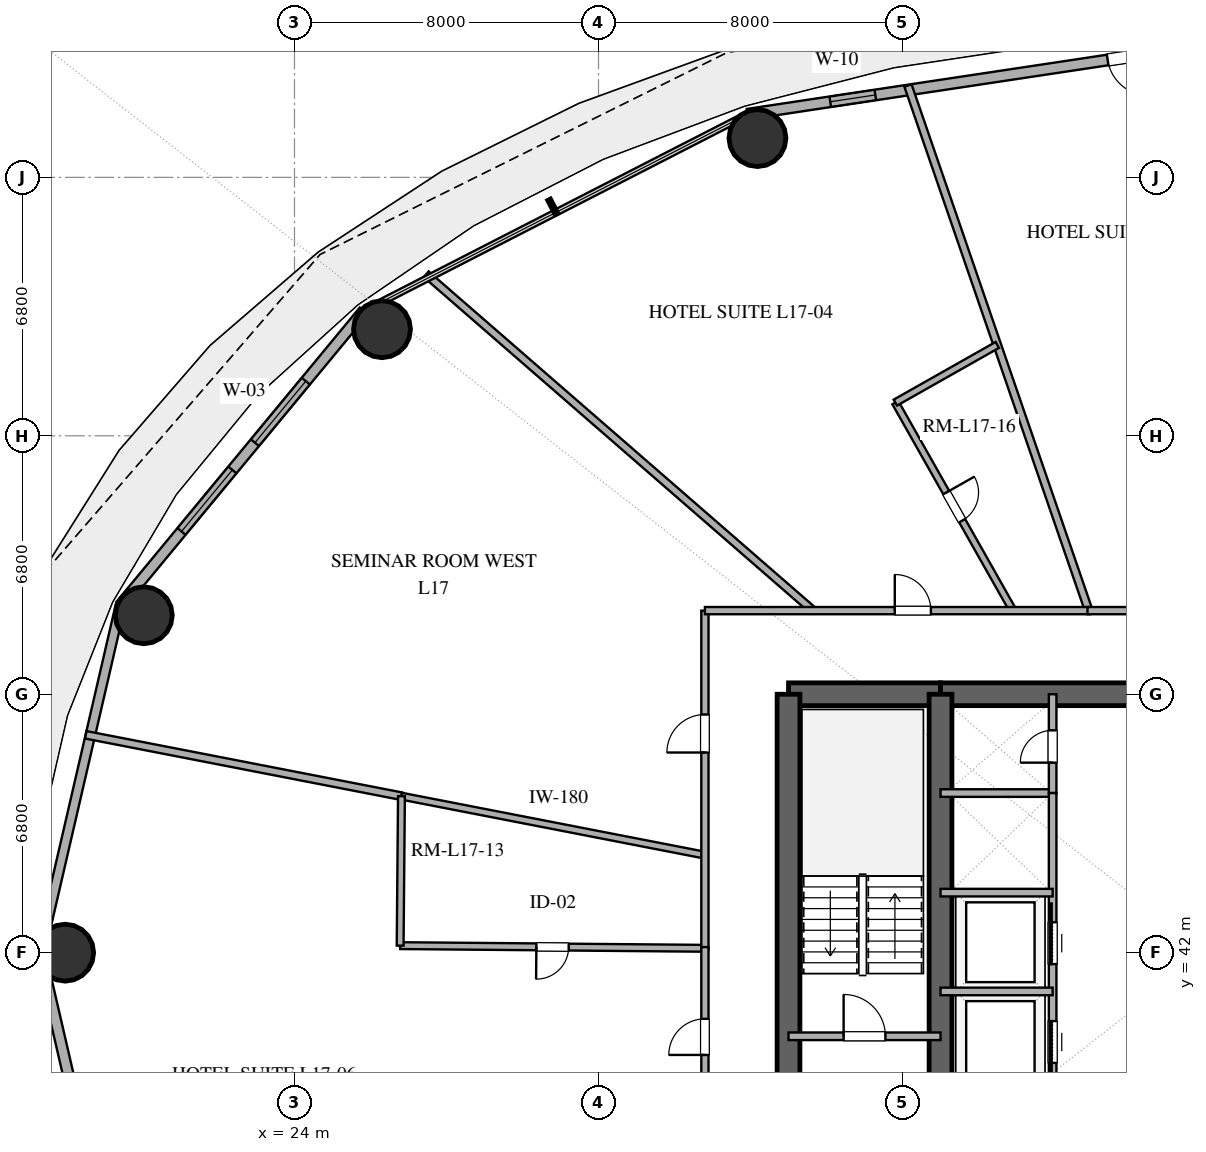
"""IFC4 building model, lengths in metres.
Left out: names, types, materials, properties, quantities, classifications, styles, units other than length and angle.
Written with IfcOpenShell. Run it as: python <this file> out.ifc"""

import sys

from ifc_helpers import new_model, si_unit, direction, frame, frame_2d, origin, origin_2d, place, context, subcontext, project, spatial, rectangle, hollow_circle, extrude, element, fill, save


model = new_model("IFC4")
c1 = context("Model", 3, precision=1e-05, world=origin(), true_north=direction((0.0, 1.0)))
c2 = subcontext(c1, "Body", "Model", "MODEL_VIEW")
j1 = project(units=[si_unit("LENGTHUNIT", "METRE"), si_unit("PLANEANGLEUNIT", "RADIAN")], contexts=[c1])
p1 = place(None, origin())
s1 = spatial("IfcSite", under=j1, at=p1, CompositionType="ELEMENT")
p2 = place(p1, origin())
s2 = spatial("IfcBuilding", under=s1, at=p2, CompositionType="ELEMENT")
p3 = place(p2, frame((0.0, 0.0, 71.4)))
s3 = spatial("IfcBuildingStorey", under=s2, at=p3, CompositionType="ELEMENT", Elevation=71.4)
p4 = place(p3, frame((37.0, 48.8, 0.0), z_axis=(0.0, 0.0, 1.0), x_axis=(1.0, 0.0, 0.0)))
e1 = element("IfcWall", 1, at=p4, inside=s3, PredefinedType="SHEAR", context=c2, shape_type="SweptSolid", body=[
    extrude(rectangle(XDim=4.0, YDim=0.6, at=frame_2d((2.0, 0.0))), origin(), (0.0, 0.0, 1.0), 3.38),
])
p5 = place(p3, frame((41.0, 48.8, 0.0), z_axis=(0.0, 0.0, 1.0), x_axis=(1.0, 0.0, 0.0)))
e2 = element("IfcWall", 2, at=p5, inside=s3, PredefinedType="SHEAR", context=c2, shape_type="SweptSolid", body=[
    extrude(rectangle(XDim=14.0, YDim=0.6, at=frame_2d((7.0, 0.0))), origin(), (0.0, 0.0, 1.0), 3.38),
])
p6 = place(p5, frame((6.1, 0.0, 0.0)))
e3 = element("IfcOpeningElement", 3, at=p6, cuts=e2, PredefinedType="OPENING", context=c2, shape_type="SweptSolid", body=[
    extrude(rectangle(XDim=1.8, YDim=2.25, at=frame_2d((0.9, 1.125))), frame((0.0, 0.31, 0.0), z_axis=(0.0, -1.0, 0.0), x_axis=(1.0, 0.0, 0.0)), (0.0, 0.0, 1.0), 0.62),
])
p7 = place(p3, frame((37.0, 35.2, 0.0), z_axis=(0.0, 0.0, 1.0), x_axis=(0.0, 1.0, 0.0)))
e4 = element("IfcWall", 4, at=p7, inside=s3, PredefinedType="SHEAR", context=c2, shape_type="SweptSolid", body=[
    extrude(rectangle(XDim=13.6, YDim=0.6, at=frame_2d((6.8, 0.0))), origin(), (0.0, 0.0, 1.0), 3.38),
])
p8 = place(p7, frame((1.5, 0.0, 0.0)))
e5 = element("IfcOpeningElement", 5, at=p8, cuts=e4, PredefinedType="OPENING", context=c2, shape_type="SweptSolid", body=[
    extrude(rectangle(XDim=1.2, YDim=2.15, at=frame_2d((0.6, 1.075))), frame((0.0, 0.31, 0.0), z_axis=(0.0, -1.0, 0.0), x_axis=(1.0, 0.0, 0.0)), (0.0, 0.0, 1.0), 0.62),
])
p9 = place(p3, frame((41.0, 35.2, 0.0), z_axis=(0.0, 0.0, 1.0), x_axis=(0.0, 1.0, 0.0)))
e6 = element("IfcWall", 6, at=p9, inside=s3, PredefinedType="SHEAR", context=c2, shape_type="SweptSolid", body=[
    extrude(rectangle(XDim=13.6, YDim=0.6, at=frame_2d((6.8, 0.0))), origin(), (0.0, 0.0, 1.0), 3.38),
])
p10 = place(p9, frame((1.15, 0.0, 0.0)))
e7 = element("IfcOpeningElement", 7, at=p10, cuts=e6, PredefinedType="OPENING", context=c2, shape_type="SweptSolid", body=[
    extrude(rectangle(XDim=1.1, YDim=2.2, at=frame_2d((0.55, 1.1))), frame((0.0, 0.31, 0.0), z_axis=(0.0, -1.0, 0.0), x_axis=(1.0, 0.0, 0.0)), (0.0, 0.0, 1.0), 0.62),
])
for number, where, z_axis, x_axis in (
    (8, (36.182, 63.434, 0.0), (0.0, 0.0, 1.0), (1.0, 0.0, 0.0)),
    (9, (26.303, 58.405, 0.0), (0.0, 0.0, 1.0), (1.0, 0.0, 0.0)),
    (10, (20.034, 50.878, 0.0), (0.0, 0.0, 1.0), (1.0, 0.0, 0.0)),
    (11, (17.965, 42.0, 0.0), (0.0, 0.0, 1.0), (1.0, 0.0, 0.0)),
):
    element("IfcColumn", number, at=place(p3, frame(where, z_axis=z_axis, x_axis=x_axis)), inside=s3, PredefinedType="COLUMN", context=c2, shape_type="SweptSolid", body=[
        extrude(hollow_circle(Radius=0.75, WallThickness=0.04, at=origin_2d()), origin(), (0.0, 0.0, 1.0), 3.38),
    ])
p11 = place(p3, frame((48.0, 65.88, 0.0), z_axis=(0.0, 0.0, 1.0), x_axis=(-0.988864835849, -0.148816452121, 0.0)))
e12 = element("IfcWall", 12, at=p11, inside=s3, PredefinedType="SOLIDWALL", context=c2, shape_type="SweptSolid", body=[
    extrude(rectangle(XDim=12.214, YDim=0.28, at=frame_2d((6.107, 0.0))), origin(), (0.0, 0.0, 1.0), 3.38),
])
p12 = place(p11, frame((1.531, 0.0, 0.0)))
e13 = element("IfcOpeningElement", 13, at=p12, cuts=e12, PredefinedType="OPENING", context=c2, shape_type="SweptSolid", body=[
    extrude(rectangle(XDim=1.1, YDim=2.25, at=frame_2d((0.55, 1.125))), frame((0.0, 0.15, 0.0), z_axis=(0.0, -1.0, 0.0), x_axis=(1.0, 0.0, 0.0)), (0.0, 0.0, 1.0), 0.3),
])
p13 = place(p11, frame((8.814, 0.0, 0.85)))
e14 = element("IfcOpeningElement", 14, at=p13, cuts=e12, PredefinedType="OPENING", context=c2, shape_type="SweptSolid", body=[
    extrude(rectangle(XDim=1.2, YDim=1.6, at=frame_2d((0.6, 0.8))), frame((0.0, 0.15, 0.0), z_axis=(0.0, -1.0, 0.0), x_axis=(1.0, 0.0, 0.0)), (0.0, 0.0, 1.0), 0.3),
])
p14 = place(p3, frame((25.826, 58.886, 0.0), z_axis=(0.0, 0.0, 1.0), x_axis=(-0.637296809613, -0.770618437657, 0.0)))
e15 = element("IfcWall", 15, at=p14, inside=s3, PredefinedType="SOLIDWALL", context=c2, shape_type="SweptSolid", body=[
    extrude(rectangle(XDim=10.053, YDim=0.28, at=frame_2d((5.027, 0.0))), origin(), (0.0, 0.0, 1.0), 3.38),
])
p15 = place(p14, frame((2.398, 0.0, 0.85)))
e16 = element("IfcOpeningElement", 16, at=p15, cuts=e15, PredefinedType="OPENING", context=c2, shape_type="SweptSolid", body=[
    extrude(rectangle(XDim=2.1, YDim=2.2, at=frame_2d((1.05, 1.1))), frame((0.0, 0.15, 0.0), z_axis=(0.0, -1.0, 0.0), x_axis=(1.0, 0.0, 0.0)), (0.0, 0.0, 1.0), 0.3),
])
p16 = place(p14, frame((5.43, 0.0, 0.85)))
e17 = element("IfcOpeningElement", 17, at=p16, cuts=e15, PredefinedType="OPENING", context=c2, shape_type="SweptSolid", body=[
    extrude(rectangle(XDim=2.1, YDim=2.2, at=frame_2d((1.05, 1.1))), frame((0.0, 0.15, 0.0), z_axis=(0.0, -1.0, 0.0), x_axis=(1.0, 0.0, 0.0)), (0.0, 0.0, 1.0), 0.3),
])
p17 = place(p3, frame((19.419, 51.138, 0.0), z_axis=(0.0, 0.0, 1.0), x_axis=(-0.225454452941, -0.974253709076, 0.0)))
e18 = element("IfcWall", 18, at=p17, inside=s3, PredefinedType="SOLIDWALL", context=c2, shape_type="SweptSolid", body=[
    extrude(rectangle(XDim=9.38, YDim=0.25, at=frame_2d((4.69, 0.0))), origin(), (0.0, 0.0, 1.0), 3.38),
])
p18 = place(p3, frame((17.304, 42.0, 0.0), z_axis=(0.0, 0.0, 1.0), x_axis=(0.225454452941, -0.974253709076, 0.0)))
e19 = element("IfcWall", 19, at=p18, inside=s3, PredefinedType="SOLIDWALL", context=c2, shape_type="SweptSolid", body=[
    extrude(rectangle(XDim=9.38, YDim=0.28, at=frame_2d((4.69, 0.0))), origin(), (0.0, 0.0, 1.0), 3.38),
])
p19 = place(p18, frame((6.785, 0.0, 0.0)))
e20 = element("IfcOpeningElement", 20, at=p19, cuts=e19, PredefinedType="OPENING", context=c2, shape_type="SweptSolid", body=[
    extrude(rectangle(XDim=1.05, YDim=2.2, at=frame_2d((0.525, 1.1))), frame((0.0, 0.15, 0.0), z_axis=(0.0, -1.0, 0.0), x_axis=(1.0, 0.0, 0.0)), (0.0, 0.0, 1.0), 0.3),
])
p20 = place(p3, frame((37.0, 39.8, 0.0), z_axis=(0.0, 0.0, 1.0), x_axis=(1.0, 0.0, 0.0)))
e21 = element("IfcWall", 21, at=p20, inside=s3, PredefinedType="SOLIDWALL", context=c2, shape_type="SweptSolid", body=[
    extrude(rectangle(XDim=4.0, YDim=0.2, at=frame_2d((2.0, 0.0))), origin(), (0.0, 0.0, 1.0), 2.74),
])
p21 = place(p20, frame((1.45, 0.0, 0.0)))
e22 = element("IfcOpeningElement", 22, at=p21, cuts=e21, PredefinedType="OPENING", context=c2, shape_type="SweptSolid", body=[
    extrude(rectangle(XDim=1.1, YDim=2.15, at=frame_2d((0.55, 1.075))), frame((0.0, 0.11, 0.0), z_axis=(0.0, -1.0, 0.0), x_axis=(1.0, 0.0, 0.0)), (0.0, 0.0, 1.0), 0.22),
])
p22 = place(p3, frame((41.0, 46.2, 0.0), z_axis=(0.0, 0.0, 1.0), x_axis=(1.0, 0.0, 0.0)))
e23 = element("IfcWall", 23, at=p22, inside=s3, PredefinedType="SOLIDWALL", context=c2, shape_type="SweptSolid", body=[
    extrude(rectangle(XDim=2.95, YDim=0.2, at=frame_2d((1.475, 0.0))), origin(), (0.0, 0.0, 1.0), 2.74),
])
p23 = place(p3, frame((43.95, 46.2, 0.0), z_axis=(0.0, 0.0, 1.0), x_axis=(0.0, 1.0, 0.0)))
e24 = element("IfcWall", 24, at=p23, inside=s3, PredefinedType="SOLIDWALL", context=c2, shape_type="SweptSolid", body=[
    extrude(rectangle(XDim=2.6, YDim=0.2, at=frame_2d((1.3, 0.0))), origin(), (0.0, 0.0, 1.0), 2.74),
])
p24 = place(p23, frame((0.8, 0.0, 0.0)))
e25 = element("IfcOpeningElement", 25, at=p24, cuts=e24, PredefinedType="OPENING", context=c2, shape_type="SweptSolid", body=[
    extrude(rectangle(XDim=0.85, YDim=2.15, at=frame_2d((0.425, 1.075))), frame((0.0, 0.11, 0.0), z_axis=(0.0, -1.0, 0.0), x_axis=(1.0, 0.0, 0.0)), (0.0, 0.0, 1.0), 0.22),
])
p25 = place(p3, frame((43.95, 38.4, 0.0), z_axis=(0.0, 0.0, 1.0), x_axis=(0.0, 1.0, 0.0)))
e26 = element("IfcWall", 26, at=p25, inside=s3, PredefinedType="SOLIDWALL", context=c2, shape_type="SweptSolid", body=[
    extrude(rectangle(XDim=7.8, YDim=0.2, at=frame_2d((3.9, 0.0))), origin(), (0.0, 0.0, 1.0), 2.74),
])
p26 = place(p25, frame((0.7, 0.0, 0.0)))
e27 = element("IfcOpeningElement", 27, at=p26, cuts=e26, PredefinedType="OPENING", context=c2, shape_type="SweptSolid", body=[
    extrude(rectangle(XDim=1.1, YDim=2.2, at=frame_2d((0.55, 1.1))), frame((0.0, 0.11, 0.0), z_axis=(0.0, -1.0, 0.0), x_axis=(1.0, 0.0, 0.0)), (0.0, 0.0, 1.0), 0.22),
])
p27 = place(p25, frame((3.3, 0.0, 0.0)))
e28 = element("IfcOpeningElement", 28, at=p27, cuts=e26, PredefinedType="OPENING", context=c2, shape_type="SweptSolid", body=[
    extrude(rectangle(XDim=1.1, YDim=2.2, at=frame_2d((0.55, 1.1))), frame((0.0, 0.11, 0.0), z_axis=(0.0, -1.0, 0.0), x_axis=(1.0, 0.0, 0.0)), (0.0, 0.0, 1.0), 0.22),
])
for number, where, z_axis, x_axis in (
    (29, (41.0, 40.98, 0.0), (0.0, 0.0, 1.0), (1.0, 0.0, 0.0)),
    (30, (41.0, 43.58, 0.0), (0.0, 0.0, 1.0), (1.0, 0.0, 0.0)),
):
    element("IfcWall", number, at=place(p3, frame(where, z_axis=z_axis, x_axis=x_axis)), inside=s3, PredefinedType="SOLIDWALL", context=c2, shape_type="SweptSolid", body=[
        extrude(rectangle(XDim=2.95, YDim=0.2, at=frame_2d((1.475, 0.0))), origin(), (0.0, 0.0, 1.0), 2.74),
    ])
p28 = place(p3, frame((37.647, 51.0, 0.0), z_axis=(0.0, 0.0, 1.0), x_axis=(-0.754713815472, 0.656054156862, 0.0)))
e31 = element("IfcWall", 31, at=p28, inside=s3, PredefinedType="PARTITIONING", context=c2, shape_type="SweptSolid", body=[
    extrude(rectangle(XDim=13.491, YDim=0.2, at=frame_2d((6.746, 0.0))), origin(), (0.0, 0.0, 1.0), 2.74),
])
p29 = place(p3, frame((18.508, 47.733, 0.0), z_axis=(0.0, 0.0, 1.0), x_axis=(0.981626048747, -0.190814832812, 0.0)))
e32 = element("IfcWall", 32, at=p29, inside=s3, PredefinedType="PARTITIONING", context=c2, shape_type="SweptSolid", body=[
    extrude(rectangle(XDim=8.462, YDim=0.2, at=frame_2d((4.231, 0.0))), origin(), (0.0, 0.0, 1.0), 2.74),
])
p30 = place(p3, frame((26.815, 46.118, 0.0), z_axis=(0.0, 0.0, 1.0), x_axis=(0.981631630513, -0.190786115787, 0.0)))
e33 = element("IfcWall", 33, at=p30, inside=s3, PredefinedType="PLUMBINGWALL", context=c2, shape_type="SweptSolid", body=[
    extrude(rectangle(XDim=8.135, YDim=0.18, at=frame_2d((4.067, 0.0))), origin(), (0.0, 0.0, 1.0), 2.74),
])
p31 = place(p3, frame((34.8, 42.115, 0.0), z_axis=(0.0, 0.0, 1.0), x_axis=(-0.999961832732, 0.008736880358, 0.0)))
e34 = element("IfcWall", 34, at=p31, inside=s3, PredefinedType="PLUMBINGWALL", context=c2, shape_type="SweptSolid", body=[
    extrude(rectangle(XDim=8.02, YDim=0.18, at=frame_2d((4.01, 0.0))), origin(), (0.0, 0.0, 1.0), 2.74),
])
p32 = place(p31, frame((3.585, 0.0, 0.0)))
e35 = element("IfcOpeningElement", 35, at=p32, cuts=e34, PredefinedType="OPENING", context=c2, shape_type="SweptSolid", body=[
    extrude(rectangle(XDim=0.85, YDim=2.1, at=frame_2d((0.425, 1.05))), frame((0.0, 0.1, 0.0), z_axis=(0.0, -1.0, 0.0), x_axis=(1.0, 0.0, 0.0)), (0.0, 0.0, 1.0), 0.2),
])
p33 = place(p3, frame((44.901, 51.0, 0.0), z_axis=(0.0, 0.0, 1.0), x_axis=(-0.325569992405, 0.945517942741, 0.0)))
e36 = element("IfcWall", 36, at=p33, inside=s3, PredefinedType="PARTITIONING", context=c2, shape_type="SweptSolid", body=[
    extrude(rectangle(XDim=14.613, YDim=0.2, at=frame_2d((7.307, 0.0))), origin(), (0.0, 0.0, 1.0), 2.74),
])
p34 = place(p3, frame((34.8, 42.083, 0.0), z_axis=(0.0, 0.0, 1.0), x_axis=(0.0, 1.0, 0.0)))
e37 = element("IfcWall", 37, at=p34, inside=s3, PredefinedType="PARTITIONING", context=c2, shape_type="SweptSolid", body=[
    extrude(rectangle(XDim=8.917, YDim=0.19, at=frame_2d((4.458, 0.0))), origin(), (0.0, 0.0, 1.0), 2.74),
])
p35 = place(p34, frame((5.183, 0.0, 0.0)))
e38 = element("IfcOpeningElement", 38, at=p35, cuts=e37, PredefinedType="OPENING", context=c2, shape_type="SweptSolid", body=[
    extrude(rectangle(XDim=1.0, YDim=2.2, at=frame_2d((0.5, 1.1))), frame((0.0, 0.105, 0.0), z_axis=(0.0, -1.0, 0.0), x_axis=(1.0, 0.0, 0.0)), (0.0, 0.0, 1.0), 0.21),
])
p36 = place(p3, frame((39.811, 56.473, 0.0), z_axis=(0.0, 0.0, 1.0), x_axis=(0.492421798109, -0.870356692826, 0.0)))
e39 = element("IfcWall", 39, at=p36, inside=s3, PredefinedType="PLUMBINGWALL", context=c2, shape_type="SweptSolid", body=[
    extrude(rectangle(XDim=6.289, YDim=0.18, at=frame_2d((3.144, 0.0))), origin(), (0.0, 0.0, 1.0), 2.74),
])
p37 = place(p36, frame((2.719, 0.0, 0.0)))
e40 = element("IfcOpeningElement", 40, at=p37, cuts=e39, PredefinedType="OPENING", context=c2, shape_type="SweptSolid", body=[
    extrude(rectangle(XDim=0.85, YDim=2.1, at=frame_2d((0.425, 1.05))), frame((0.0, 0.1, 0.0), z_axis=(0.0, -1.0, 0.0), x_axis=(1.0, 0.0, 0.0)), (0.0, 0.0, 1.0), 0.2),
])
p38 = place(p3, frame((34.8, 51.0, 0.0), z_axis=(0.0, 0.0, 1.0), x_axis=(1.0, 0.0, 0.0)))
e41 = element("IfcWall", 41, at=p38, inside=s3, PredefinedType="PARTITIONING", context=c2, shape_type="SweptSolid", body=[
    extrude(rectangle(XDim=10.135, YDim=0.19, at=frame_2d((5.067, 0.0))), origin(), (0.0, 0.0, 1.0), 2.74),
])
p39 = place(p38, frame((4.996, 0.0, 0.0)))
e42 = element("IfcOpeningElement", 42, at=p39, cuts=e41, PredefinedType="OPENING", context=c2, shape_type="SweptSolid", body=[
    extrude(rectangle(XDim=0.95, YDim=2.15, at=frame_2d((0.475, 1.075))), frame((0.0, 0.105, 0.0), z_axis=(0.0, -1.0, 0.0), x_axis=(1.0, 0.0, 0.0)), (0.0, 0.0, 1.0), 0.21),
])
p40 = place(p3, frame((34.8, 33.0, 0.0), z_axis=(0.0, 0.0, 1.0), x_axis=(0.0, 1.0, 0.0)))
e43 = element("IfcWall", 43, at=p40, inside=s3, PredefinedType="PARTITIONING", context=c2, shape_type="SweptSolid", body=[
    extrude(rectangle(XDim=9.147, YDim=0.19, at=frame_2d((4.574, 0.0))), origin(), (0.0, 0.0, 1.0), 2.74),
])
p41 = place(p40, frame((6.309, 0.0, 0.0)))
e44 = element("IfcOpeningElement", 44, at=p41, cuts=e43, PredefinedType="OPENING", context=c2, shape_type="SweptSolid", body=[
    extrude(rectangle(XDim=0.95, YDim=2.15, at=frame_2d((0.475, 1.075))), frame((0.0, 0.105, 0.0), z_axis=(0.0, -1.0, 0.0), x_axis=(1.0, 0.0, 0.0)), (0.0, 0.0, 1.0), 0.21),
])
p42 = place(p3, frame((26.781, 42.185, 0.0), z_axis=(0.0, 0.0, 1.0), x_axis=(0.008691005249, 0.999962232501, 0.0)))
e45 = element("IfcWall", 45, at=p42, inside=s3, PredefinedType="PLUMBINGWALL", context=c2, shape_type="SweptSolid", body=[
    extrude(rectangle(XDim=3.933, YDim=0.18, at=frame_2d((1.966, 0.0))), origin(), (0.0, 0.0, 1.0), 2.74),
])
p43 = place(p3, frame((44.867, 51.0, 0.0), z_axis=(0.0, 0.0, 1.0), x_axis=(1.0, 0.0, 0.0)))
e46 = element("IfcWall", 46, at=p43, inside=s3, PredefinedType="PARTITIONING", context=c2, shape_type="SweptSolid", body=[
    extrude(rectangle(XDim=3.243, YDim=0.19, at=frame_2d((1.622, 0.0))), origin(), (0.0, 0.0, 1.0), 2.74),
])
p44 = place(p43, frame((1.146, 0.0, 0.0)))
e47 = element("IfcOpeningElement", 47, at=p44, cuts=e46, PredefinedType="OPENING", context=c2, shape_type="SweptSolid", body=[
    extrude(rectangle(XDim=0.95, YDim=2.15, at=frame_2d((0.475, 1.075))), frame((0.0, 0.105, 0.0), z_axis=(0.0, -1.0, 0.0), x_axis=(1.0, 0.0, 0.0)), (0.0, 0.0, 1.0), 0.21),
])
p45 = place(p3, frame((42.494, 57.991, 0.0), z_axis=(0.0, 0.0, 1.0), x_axis=(-0.87034589465, -0.492440883422, 0.0)))
e48 = element("IfcWall", 48, at=p45, inside=s3, PredefinedType="PLUMBINGWALL", context=c2, shape_type="SweptSolid", body=[
    extrude(rectangle(XDim=3.082, YDim=0.18, at=frame_2d((1.541, 0.0))), origin(), (0.0, 0.0, 1.0), 2.74),
])
p46 = place(p12, origin())
e49 = element("IfcDoor", 49, at=p46, inside=s3, OperationType="SINGLE_SWING_LEFT", PredefinedType="DOOR", context=c2, shape_type="SweptSolid", body=[
    extrude(rectangle(XDim=1.1, YDim=2.25, at=frame_2d((0.55, 1.125))), frame((0.0, 0.025, 0.0), z_axis=(0.0, -1.0, 0.0), x_axis=(1.0, 0.0, 0.0)), (0.0, 0.0, 1.0), 0.05),
])
fill(e13, e49)
p47 = place(p13, origin())
e50 = element("IfcWindow", 50, at=p47, inside=s3, PartitioningType="SINGLE_PANEL", PredefinedType="WINDOW", context=c2, shape_type="SweptSolid", body=[
    extrude(rectangle(XDim=1.2, YDim=1.6, at=frame_2d((0.6, 0.8))), frame((0.0, 0.03, 0.0), z_axis=(0.0, -1.0, 0.0), x_axis=(1.0, 0.0, 0.0)), (0.0, 0.0, 1.0), 0.06),
])
fill(e14, e50)
p48 = place(p15, origin())
e51 = element("IfcWindow", 51, at=p48, inside=s3, PartitioningType="SINGLE_PANEL", PredefinedType="WINDOW", context=c2, shape_type="SweptSolid", body=[
    extrude(rectangle(XDim=2.1, YDim=2.2, at=frame_2d((1.05, 1.1))), frame((0.0, 0.03, 0.0), z_axis=(0.0, -1.0, 0.0), x_axis=(1.0, 0.0, 0.0)), (0.0, 0.0, 1.0), 0.06),
])
fill(e16, e51)
p49 = place(p16, origin())
e52 = element("IfcWindow", 52, at=p49, inside=s3, PartitioningType="SINGLE_PANEL", PredefinedType="WINDOW", context=c2, shape_type="SweptSolid", body=[
    extrude(rectangle(XDim=2.1, YDim=2.2, at=frame_2d((1.05, 1.1))), frame((0.0, 0.03, 0.0), z_axis=(0.0, -1.0, 0.0), x_axis=(1.0, 0.0, 0.0)), (0.0, 0.0, 1.0), 0.06),
])
fill(e17, e52)
p50 = place(p21, origin())
e53 = element("IfcDoor", 53, at=p50, inside=s3, OperationType="SINGLE_SWING_LEFT", PredefinedType="DOOR", context=c2, shape_type="SweptSolid", body=[
    extrude(rectangle(XDim=1.1, YDim=2.15, at=frame_2d((0.55, 1.075))), frame((0.0, 0.025, 0.0), z_axis=(0.0, -1.0, 0.0), x_axis=(1.0, 0.0, 0.0)), (0.0, 0.0, 1.0), 0.05),
])
fill(e22, e53)
p51 = place(p24, origin())
e54 = element("IfcDoor", 54, at=p51, inside=s3, OperationType="SINGLE_SWING_LEFT", PredefinedType="DOOR", context=c2, shape_type="SweptSolid", body=[
    extrude(rectangle(XDim=0.85, YDim=2.15, at=frame_2d((0.425, 1.075))), frame((0.0, 0.025, 0.0), z_axis=(0.0, -1.0, 0.0), x_axis=(1.0, 0.0, 0.0)), (0.0, 0.0, 1.0), 0.05),
])
fill(e25, e54)
p52 = place(p26, origin())
e55 = element("IfcDoor", 55, at=p52, inside=s3, OperationType="SLIDING_TO_LEFT", PredefinedType="DOOR", context=c2, shape_type="SweptSolid", body=[
    extrude(rectangle(XDim=1.1, YDim=2.2, at=frame_2d((0.55, 1.1))), frame((0.0, 0.025, 0.0), z_axis=(0.0, -1.0, 0.0), x_axis=(1.0, 0.0, 0.0)), (0.0, 0.0, 1.0), 0.05),
])
fill(e27, e55)
p53 = place(p27, origin())
e56 = element("IfcDoor", 56, at=p53, inside=s3, OperationType="SLIDING_TO_RIGHT", PredefinedType="DOOR", context=c2, shape_type="SweptSolid", body=[
    extrude(rectangle(XDim=1.1, YDim=2.2, at=frame_2d((0.55, 1.1))), frame((0.0, 0.025, 0.0), z_axis=(0.0, -1.0, 0.0), x_axis=(1.0, 0.0, 0.0)), (0.0, 0.0, 1.0), 0.05),
])
fill(e28, e56)
p54 = place(p32, origin())
e57 = element("IfcDoor", 57, at=p54, inside=s3, OperationType="SINGLE_SWING_RIGHT", PredefinedType="DOOR", context=c2, shape_type="SweptSolid", body=[
    extrude(rectangle(XDim=0.85, YDim=2.1, at=frame_2d((0.425, 1.05))), frame((0.0, 0.025, 0.0), z_axis=(0.0, -1.0, 0.0), x_axis=(1.0, 0.0, 0.0)), (0.0, 0.0, 1.0), 0.05),
])
fill(e35, e57)
p55 = place(p35, origin())
e58 = element("IfcDoor", 58, at=p55, inside=s3, OperationType="SINGLE_SWING_LEFT", PredefinedType="DOOR", context=c2, shape_type="SweptSolid", body=[
    extrude(rectangle(XDim=1.0, YDim=2.2, at=frame_2d((0.5, 1.1))), frame((0.0, 0.025, 0.0), z_axis=(0.0, -1.0, 0.0), x_axis=(1.0, 0.0, 0.0)), (0.0, 0.0, 1.0), 0.05),
])
fill(e38, e58)
p56 = place(p37, origin())
e59 = element("IfcDoor", 59, at=p56, inside=s3, OperationType="SINGLE_SWING_LEFT", PredefinedType="DOOR", context=c2, shape_type="SweptSolid", body=[
    extrude(rectangle(XDim=0.85, YDim=2.1, at=frame_2d((0.425, 1.05))), frame((0.0, 0.025, 0.0), z_axis=(0.0, -1.0, 0.0), x_axis=(1.0, 0.0, 0.0)), (0.0, 0.0, 1.0), 0.05),
])
fill(e40, e59)
p57 = place(p39, origin())
e60 = element("IfcDoor", 60, at=p57, inside=s3, OperationType="SINGLE_SWING_LEFT", PredefinedType="DOOR", context=c2, shape_type="SweptSolid", body=[
    extrude(rectangle(XDim=0.95, YDim=2.15, at=frame_2d((0.475, 1.075))), frame((0.0, 0.025, 0.0), z_axis=(0.0, -1.0, 0.0), x_axis=(1.0, 0.0, 0.0)), (0.0, 0.0, 1.0), 0.05),
])
fill(e42, e60)
p58 = place(p41, origin())
e61 = element("IfcDoor", 61, at=p58, inside=s3, OperationType="SINGLE_SWING_LEFT", PredefinedType="DOOR", context=c2, shape_type="SweptSolid", body=[
    extrude(rectangle(XDim=0.95, YDim=2.15, at=frame_2d((0.475, 1.075))), frame((0.0, 0.025, 0.0), z_axis=(0.0, -1.0, 0.0), x_axis=(1.0, 0.0, 0.0)), (0.0, 0.0, 1.0), 0.05),
])
fill(e44, e61)
save(model, sys.argv[1])
